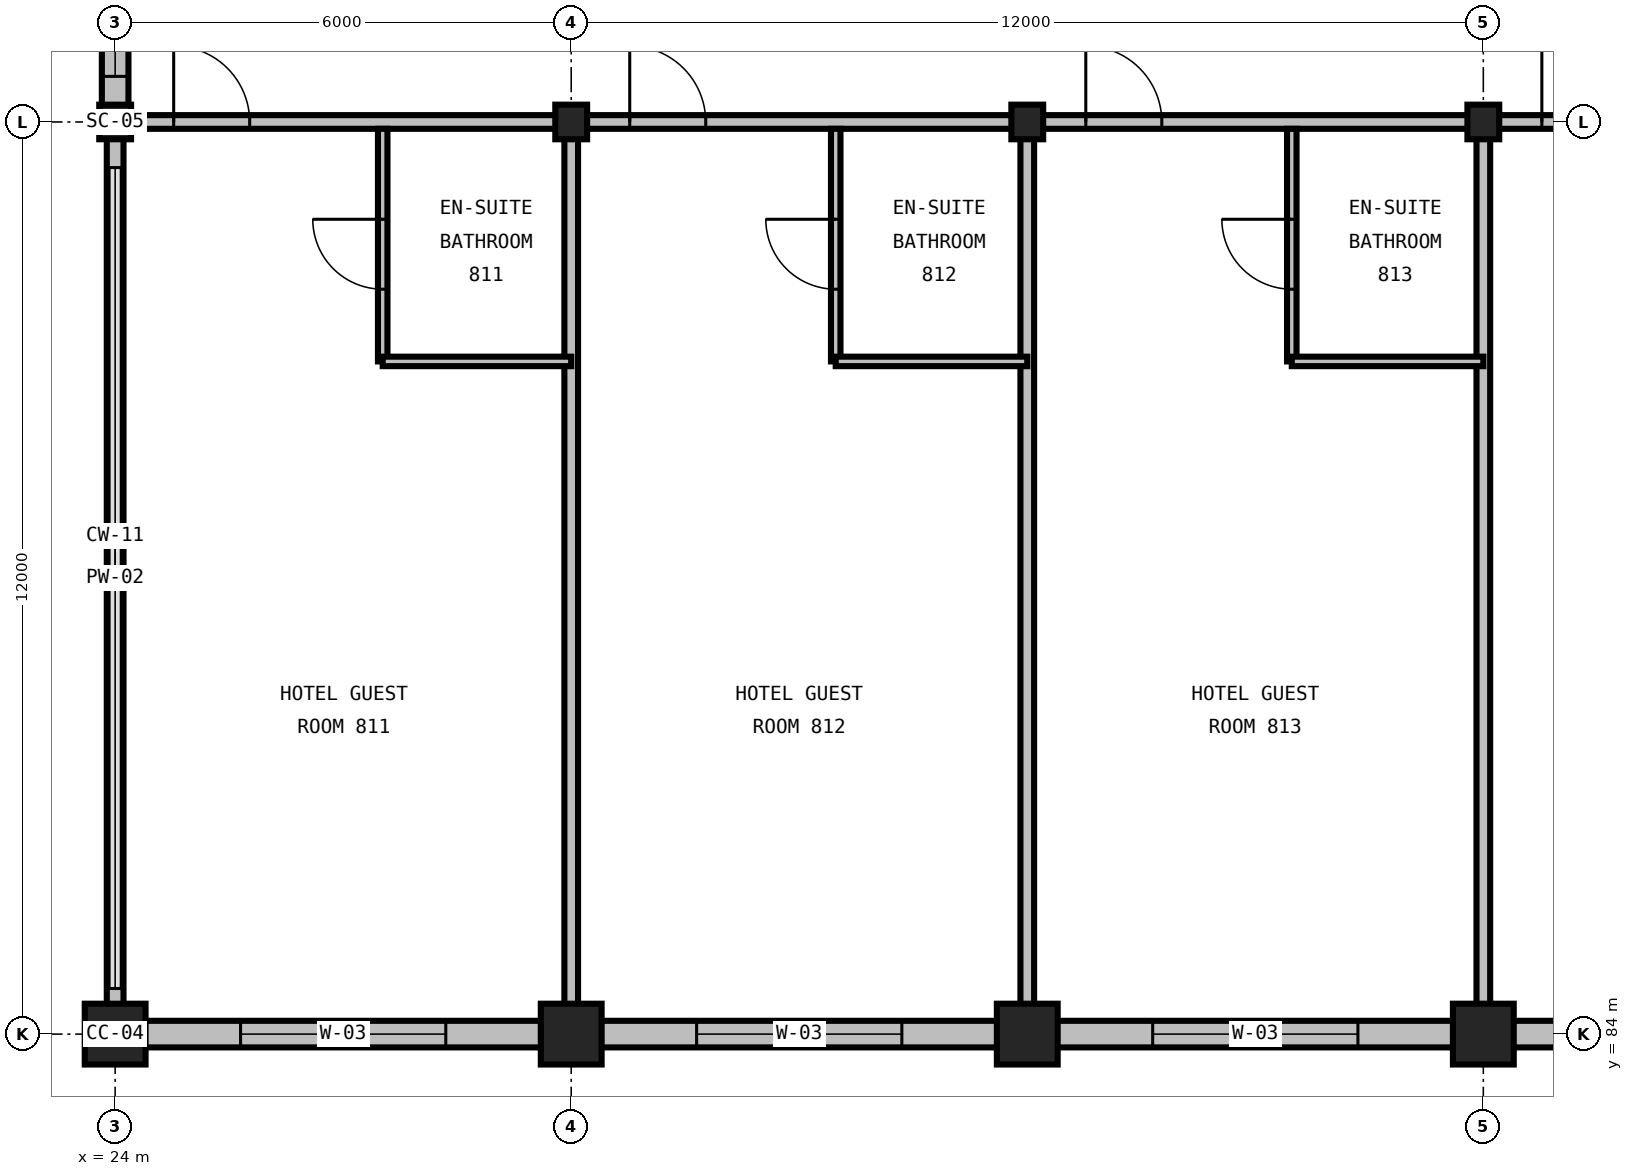
"""IFC4 building model, lengths in metres.
Left out: names, types, materials, properties, quantities, classifications, styles, units other than length and angle.
Written with IfcOpenShell. Run it as: python <this file> out.ifc"""

import sys

from ifc_helpers import new_model, si_unit, direction, frame, frame_2d, origin, origin_2d, place, context, subcontext, project, spatial, rectangle, i_section, extrude, element, fill, save


model = new_model("IFC4")
c1 = context("Model", 3, precision=1e-05, world=origin(), true_north=direction((0.0, 1.0)))
c2 = subcontext(c1, "Body", "Model", "MODEL_VIEW")
j1 = project(units=[si_unit("LENGTHUNIT", "METRE"), si_unit("PLANEANGLEUNIT", "RADIAN")], contexts=[c1])
p1 = place(None, origin())
s1 = spatial("IfcSite", under=j1, at=p1, CompositionType="ELEMENT")
p2 = place(p1, origin())
s2 = spatial("IfcBuilding", under=s1, at=p2, CompositionType="ELEMENT")
p3 = place(p2, frame((0.0, 0.0, 38.4)))
s3 = spatial("IfcBuildingStorey", under=s2, at=p3, CompositionType="ELEMENT", Elevation=38.4)
p4 = place(p3, frame((24.0, 84.0, 0.0), z_axis=(0.0, 0.0, 1.0), x_axis=(1.0, 0.0, 0.0)))
e1 = element("IfcColumn", 1, at=p4, inside=s3, PredefinedType="COLUMN", context=c2, shape_type="SweptSolid", body=[
    extrude(rectangle(XDim=0.8, YDim=0.8, at=origin_2d()), origin(), (0.0, 0.0, 1.0), 3.6),
])
p5 = place(p3, frame((24.0, 96.0, 0.0), z_axis=(0.0, 0.0, 1.0), x_axis=(1.0, 0.0, 0.0)))
e2 = element("IfcColumn", 2, at=p5, inside=s3, PredefinedType="COLUMN", context=c2, shape_type="SweptSolid", body=[
    extrude(i_section(OverallWidth=0.419, OverallDepth=0.455, WebThickness=0.042, FlangeThickness=0.068, FilletRadius=0.031, at=origin_2d()), origin(), (0.0, 0.0, 1.0), 3.6),
])
p6 = place(p3, frame((30.0, 84.0, 0.0), z_axis=(0.0, 0.0, 1.0), x_axis=(1.0, 0.0, 0.0)))
e3 = element("IfcColumn", 3, at=p6, inside=s3, PredefinedType="COLUMN", context=c2, shape_type="SweptSolid", body=[
    extrude(rectangle(XDim=0.8, YDim=0.8, at=origin_2d()), origin(), (0.0, 0.0, 1.0), 3.6),
])
p7 = place(p3, frame((30.0, 96.0, 0.0), z_axis=(0.0, 0.0, 1.0), x_axis=(1.0, 0.0, 0.0)))
e4 = element("IfcColumn", 4, at=p7, inside=s3, PredefinedType="COLUMN", context=c2, shape_type="SweptSolid", body=[
    extrude(i_section(OverallWidth=0.419, OverallDepth=0.455, WebThickness=0.042, FlangeThickness=0.068, FilletRadius=0.031, at=origin_2d()), origin(), (0.0, 0.0, 1.0), 3.6),
])
p8 = place(p3, frame((36.0, 84.0, 0.0), z_axis=(0.0, 0.0, 1.0), x_axis=(1.0, 0.0, 0.0)))
e5 = element("IfcColumn", 5, at=p8, inside=s3, PredefinedType="COLUMN", context=c2, shape_type="SweptSolid", body=[
    extrude(rectangle(XDim=0.8, YDim=0.8, at=origin_2d()), origin(), (0.0, 0.0, 1.0), 3.6),
])
p9 = place(p3, frame((36.0, 96.0, 0.0), z_axis=(0.0, 0.0, 1.0), x_axis=(1.0, 0.0, 0.0)))
e6 = element("IfcColumn", 6, at=p9, inside=s3, PredefinedType="COLUMN", context=c2, shape_type="SweptSolid", body=[
    extrude(i_section(OverallWidth=0.419, OverallDepth=0.455, WebThickness=0.042, FlangeThickness=0.068, FilletRadius=0.031, at=origin_2d()), origin(), (0.0, 0.0, 1.0), 3.6),
])
p10 = place(p3, frame((42.0, 84.0, 0.0), z_axis=(0.0, 0.0, 1.0), x_axis=(1.0, 0.0, 0.0)))
e7 = element("IfcColumn", 7, at=p10, inside=s3, PredefinedType="COLUMN", context=c2, shape_type="SweptSolid", body=[
    extrude(rectangle(XDim=0.8, YDim=0.8, at=origin_2d()), origin(), (0.0, 0.0, 1.0), 3.6),
])
p11 = place(p3, frame((42.0, 96.0, 0.0), z_axis=(0.0, 0.0, 1.0), x_axis=(1.0, 0.0, 0.0)))
e8 = element("IfcColumn", 8, at=p11, inside=s3, PredefinedType="COLUMN", context=c2, shape_type="SweptSolid", body=[
    extrude(i_section(OverallWidth=0.419, OverallDepth=0.455, WebThickness=0.042, FlangeThickness=0.068, FilletRadius=0.031, at=origin_2d()), origin(), (0.0, 0.0, 1.0), 3.6),
])
p12 = place(p3, frame((24.0, 84.0, 0.0), z_axis=(0.0, 0.0, 1.0), x_axis=(1.0, 0.0, 0.0)))
e9 = element("IfcWall", 9, at=p12, inside=s3, PredefinedType="STANDARD", context=c2, shape_type="SweptSolid", body=[
    extrude(rectangle(XDim=6.0, YDim=0.35, at=frame_2d((3.0, 0.0))), origin(), (0.0, 0.0, 1.0), 2.486),
])
p13 = place(p12, frame((1.65, 0.0, 0.72)))
e10 = element("IfcOpeningElement", 10, at=p13, cuts=e9, PredefinedType="OPENING", context=c2, shape_type="SweptSolid", body=[
    extrude(rectangle(XDim=2.7, YDim=1.65, at=frame_2d((1.35, 0.825))), frame((0.0, 0.19, 0.0), z_axis=(0.0, -1.0, 0.0), x_axis=(1.0, 0.0, 0.0)), (0.0, 0.0, 1.0), 0.38),
])
p14 = place(p3, frame((30.0, 84.0, 0.0), z_axis=(0.0, 0.0, 1.0), x_axis=(1.0, 0.0, 0.0)))
e11 = element("IfcWall", 11, at=p14, inside=s3, PredefinedType="STANDARD", context=c2, shape_type="SweptSolid", body=[
    extrude(rectangle(XDim=6.0, YDim=0.35, at=frame_2d((3.0, 0.0))), origin(), (0.0, 0.0, 1.0), 2.486),
])
p15 = place(p14, frame((1.65, 0.0, 0.72)))
e12 = element("IfcOpeningElement", 12, at=p15, cuts=e11, PredefinedType="OPENING", context=c2, shape_type="SweptSolid", body=[
    extrude(rectangle(XDim=2.7, YDim=1.65, at=frame_2d((1.35, 0.825))), frame((0.0, 0.19, 0.0), z_axis=(0.0, -1.0, 0.0), x_axis=(1.0, 0.0, 0.0)), (0.0, 0.0, 1.0), 0.38),
])
p16 = place(p3, frame((36.0, 84.0, 0.0), z_axis=(0.0, 0.0, 1.0), x_axis=(1.0, 0.0, 0.0)))
e13 = element("IfcWall", 13, at=p16, inside=s3, PredefinedType="STANDARD", context=c2, shape_type="SweptSolid", body=[
    extrude(rectangle(XDim=6.0, YDim=0.35, at=frame_2d((3.0, 0.0))), origin(), (0.0, 0.0, 1.0), 2.486),
])
p17 = place(p16, frame((1.65, 0.0, 0.72)))
e14 = element("IfcOpeningElement", 14, at=p17, cuts=e13, PredefinedType="OPENING", context=c2, shape_type="SweptSolid", body=[
    extrude(rectangle(XDim=2.7, YDim=1.65, at=frame_2d((1.35, 0.825))), frame((0.0, 0.19, 0.0), z_axis=(0.0, -1.0, 0.0), x_axis=(1.0, 0.0, 0.0)), (0.0, 0.0, 1.0), 0.38),
])
p18 = place(p3, frame((42.0, 84.0, 0.0), z_axis=(0.0, 0.0, 1.0), x_axis=(1.0, 0.0, 0.0)))
e15 = element("IfcWall", 15, at=p18, inside=s3, PredefinedType="STANDARD", context=c2, shape_type="SweptSolid", body=[
    extrude(rectangle(XDim=12.0, YDim=0.35, at=frame_2d((6.0, 0.0))), origin(), (0.0, 0.0, 1.0), 2.486),
])
p19 = place(p18, frame((1.65, 0.0, 0.72)))
e16 = element("IfcOpeningElement", 16, at=p19, cuts=e15, PredefinedType="OPENING", context=c2, shape_type="SweptSolid", body=[
    extrude(rectangle(XDim=2.7, YDim=1.65, at=frame_2d((1.35, 0.825))), frame((0.0, 0.19, 0.0), z_axis=(0.0, -1.0, 0.0), x_axis=(1.0, 0.0, 0.0)), (0.0, 0.0, 1.0), 0.38),
])
p20 = place(p18, frame((7.65, 0.0, 0.72)))
e17 = element("IfcOpeningElement", 17, at=p20, cuts=e15, PredefinedType="OPENING", context=c2, shape_type="SweptSolid", body=[
    extrude(rectangle(XDim=2.7, YDim=1.65, at=frame_2d((1.35, 0.825))), frame((0.0, 0.19, 0.0), z_axis=(0.0, -1.0, 0.0), x_axis=(1.0, 0.0, 0.0)), (0.0, 0.0, 1.0), 0.38),
])
p21 = place(p3, frame((24.0, 96.0, 0.0), z_axis=(0.0, 0.0, 1.0), x_axis=(0.0, -1.0, 0.0)))
e18 = element("IfcWall", 18, at=p21, inside=s3, PredefinedType="PARAPET", context=c2, shape_type="SweptSolid", body=[
    extrude(rectangle(XDim=12.0, YDim=0.22, at=frame_2d((6.0, 0.0))), origin(), (0.0, 0.0, 1.0), 0.2),
])
p22 = place(p3, frame((24.0, 105.0, 0.0), z_axis=(0.0, 0.0, 1.0), x_axis=(0.0, -1.0, 0.0)))
e19 = element("IfcWall", 19, at=p22, inside=s3, PredefinedType="STANDARD", context=c2, shape_type="SweptSolid", body=[
    extrude(rectangle(XDim=9.0, YDim=0.35, at=frame_2d((4.5, 0.0))), origin(), (0.0, 0.0, 1.0), 2.981),
])
p23 = place(p22, frame((6.6, 0.0, 0.85)))
e20 = element("IfcOpeningElement", 20, at=p23, cuts=e19, PredefinedType="OPENING", context=c2, shape_type="SweptSolid", body=[
    extrude(rectangle(XDim=1.8, YDim=1.5, at=frame_2d((0.9, 0.75))), frame((0.0, 0.19, 0.0), z_axis=(0.0, -1.0, 0.0), x_axis=(1.0, 0.0, 0.0)), (0.0, 0.0, 1.0), 0.38),
])
p24 = place(p3, frame((24.085, 96.0, 0.0), z_axis=(0.0, 0.0, 1.0), x_axis=(1.0, 0.0, 0.0)))
e21 = element("IfcWall", 21, at=p24, inside=s3, PredefinedType="PARTITIONING", context=c2, shape_type="SweptSolid", body=[
    extrude(rectangle(XDim=5.915, YDim=0.18, at=frame_2d((2.957, 0.0))), origin(), (0.0, 0.0, 1.0), 2.736),
])
p25 = place(p24, frame((0.685, 0.0, 0.0)))
e22 = element("IfcOpeningElement", 22, at=p25, cuts=e21, PredefinedType="OPENING", context=c2, shape_type="SweptSolid", body=[
    extrude(rectangle(XDim=1.0, YDim=2.15, at=frame_2d((0.5, 1.075))), frame((0.0, 0.105, 0.0), z_axis=(0.0, -1.0, 0.0), x_axis=(1.0, 0.0, 0.0)), (0.0, 0.0, 1.0), 0.21),
])
p26 = place(p3, frame((30.0, 84.175, 0.0), z_axis=(0.0, 0.0, 1.0), x_axis=(0.0, 1.0, 0.0)))
e23 = element("IfcWall", 23, at=p26, inside=s3, PredefinedType="PARTITIONING", context=c2, shape_type="SweptSolid", body=[
    extrude(rectangle(XDim=11.825, YDim=0.18, at=frame_2d((5.913, 0.0))), origin(), (0.0, 0.0, 1.0), 2.59),
])
p27 = place(p3, frame((27.52, 92.85, 0.0), z_axis=(0.0, 0.0, 1.0), x_axis=(0.0, 1.0, 0.0)))
e24 = element("IfcWall", 24, at=p27, inside=s3, PredefinedType="PARTITIONING", context=c2, shape_type="SweptSolid", body=[
    extrude(rectangle(XDim=3.06, YDim=0.125, at=frame_2d((1.53, 0.0))), origin(), (0.0, 0.0, 1.0), 3.29),
])
p28 = place(p27, frame((0.95, 0.0, 0.0)))
e25 = element("IfcOpeningElement", 25, at=p28, cuts=e24, PredefinedType="OPENING", context=c2, shape_type="SweptSolid", body=[
    extrude(rectangle(XDim=0.92, YDim=2.1, at=frame_2d((0.46, 1.05))), frame((0.0, 0.077, 0.0), z_axis=(0.0, -1.0, 0.0), x_axis=(1.0, 0.0, 0.0)), (0.0, 0.0, 1.0), 0.155),
])
p29 = place(p3, frame((27.52, 92.85, 0.0), z_axis=(0.0, 0.0, 1.0), x_axis=(1.0, 0.0, 0.0)))
e26 = element("IfcWall", 26, at=p29, inside=s3, PredefinedType="PARTITIONING", context=c2, shape_type="SweptSolid", body=[
    extrude(rectangle(XDim=2.48, YDim=0.125, at=frame_2d((1.24, 0.0))), origin(), (0.0, 0.0, 1.0), 3.29),
])
p30 = place(p3, frame((30.0, 96.0, 0.0), z_axis=(0.0, 0.0, 1.0), x_axis=(1.0, 0.0, 0.0)))
e27 = element("IfcWall", 27, at=p30, inside=s3, PredefinedType="PARTITIONING", context=c2, shape_type="SweptSolid", body=[
    extrude(rectangle(XDim=6.0, YDim=0.18, at=frame_2d((3.0, 0.0))), origin(), (0.0, 0.0, 1.0), 2.736),
])
p31 = place(p30, frame((0.77, 0.0, 0.0)))
e28 = element("IfcOpeningElement", 28, at=p31, cuts=e27, PredefinedType="OPENING", context=c2, shape_type="SweptSolid", body=[
    extrude(rectangle(XDim=1.0, YDim=2.15, at=frame_2d((0.5, 1.075))), frame((0.0, 0.105, 0.0), z_axis=(0.0, -1.0, 0.0), x_axis=(1.0, 0.0, 0.0)), (0.0, 0.0, 1.0), 0.21),
])
p32 = place(p3, frame((36.0, 84.175, 0.0), z_axis=(0.0, 0.0, 1.0), x_axis=(0.0, 1.0, 0.0)))
e29 = element("IfcWall", 29, at=p32, inside=s3, PredefinedType="PARTITIONING", context=c2, shape_type="SweptSolid", body=[
    extrude(rectangle(XDim=11.825, YDim=0.18, at=frame_2d((5.913, 0.0))), origin(), (0.0, 0.0, 1.0), 2.59),
])
p33 = place(p3, frame((33.48, 92.85, 0.0), z_axis=(0.0, 0.0, 1.0), x_axis=(0.0, 1.0, 0.0)))
e30 = element("IfcWall", 30, at=p33, inside=s3, PredefinedType="PARTITIONING", context=c2, shape_type="SweptSolid", body=[
    extrude(rectangle(XDim=3.06, YDim=0.125, at=frame_2d((1.53, 0.0))), origin(), (0.0, 0.0, 1.0), 3.29),
])
p34 = place(p33, frame((0.95, 0.0, 0.0)))
e31 = element("IfcOpeningElement", 31, at=p34, cuts=e30, PredefinedType="OPENING", context=c2, shape_type="SweptSolid", body=[
    extrude(rectangle(XDim=0.92, YDim=2.1, at=frame_2d((0.46, 1.05))), frame((0.0, 0.077, 0.0), z_axis=(0.0, -1.0, 0.0), x_axis=(1.0, 0.0, 0.0)), (0.0, 0.0, 1.0), 0.155),
])
p35 = place(p3, frame((33.48, 92.85, 0.0), z_axis=(0.0, 0.0, 1.0), x_axis=(1.0, 0.0, 0.0)))
e32 = element("IfcWall", 32, at=p35, inside=s3, PredefinedType="PARTITIONING", context=c2, shape_type="SweptSolid", body=[
    extrude(rectangle(XDim=2.52, YDim=0.125, at=frame_2d((1.26, 0.0))), origin(), (0.0, 0.0, 1.0), 3.29),
])
p36 = place(p3, frame((36.0, 96.0, 0.0), z_axis=(0.0, 0.0, 1.0), x_axis=(1.0, 0.0, 0.0)))
e33 = element("IfcWall", 33, at=p36, inside=s3, PredefinedType="PARTITIONING", context=c2, shape_type="SweptSolid", body=[
    extrude(rectangle(XDim=6.0, YDim=0.18, at=frame_2d((3.0, 0.0))), origin(), (0.0, 0.0, 1.0), 2.736),
])
p37 = place(p36, frame((0.77, 0.0, 0.0)))
e34 = element("IfcOpeningElement", 34, at=p37, cuts=e33, PredefinedType="OPENING", context=c2, shape_type="SweptSolid", body=[
    extrude(rectangle(XDim=1.0, YDim=2.15, at=frame_2d((0.5, 1.075))), frame((0.0, 0.105, 0.0), z_axis=(0.0, -1.0, 0.0), x_axis=(1.0, 0.0, 0.0)), (0.0, 0.0, 1.0), 0.21),
])
p38 = place(p3, frame((42.0, 84.175, 0.0), z_axis=(0.0, 0.0, 1.0), x_axis=(0.0, 1.0, 0.0)))
e35 = element("IfcWall", 35, at=p38, inside=s3, PredefinedType="PARTITIONING", context=c2, shape_type="SweptSolid", body=[
    extrude(rectangle(XDim=11.825, YDim=0.18, at=frame_2d((5.913, 0.0))), origin(), (0.0, 0.0, 1.0), 2.59),
])
p39 = place(p3, frame((39.48, 92.85, 0.0), z_axis=(0.0, 0.0, 1.0), x_axis=(0.0, 1.0, 0.0)))
e36 = element("IfcWall", 36, at=p39, inside=s3, PredefinedType="PARTITIONING", context=c2, shape_type="SweptSolid", body=[
    extrude(rectangle(XDim=3.06, YDim=0.125, at=frame_2d((1.53, 0.0))), origin(), (0.0, 0.0, 1.0), 3.29),
])
p40 = place(p39, frame((0.95, 0.0, 0.0)))
e37 = element("IfcOpeningElement", 37, at=p40, cuts=e36, PredefinedType="OPENING", context=c2, shape_type="SweptSolid", body=[
    extrude(rectangle(XDim=0.92, YDim=2.1, at=frame_2d((0.46, 1.05))), frame((0.0, 0.077, 0.0), z_axis=(0.0, -1.0, 0.0), x_axis=(1.0, 0.0, 0.0)), (0.0, 0.0, 1.0), 0.155),
])
p41 = place(p3, frame((39.48, 92.85, 0.0), z_axis=(0.0, 0.0, 1.0), x_axis=(1.0, 0.0, 0.0)))
e38 = element("IfcWall", 38, at=p41, inside=s3, PredefinedType="PARTITIONING", context=c2, shape_type="SweptSolid", body=[
    extrude(rectangle(XDim=2.52, YDim=0.125, at=frame_2d((1.26, 0.0))), origin(), (0.0, 0.0, 1.0), 3.29),
])
p42 = place(p3, frame((42.0, 96.0, 0.0), z_axis=(0.0, 0.0, 1.0), x_axis=(1.0, 0.0, 0.0)))
e39 = element("IfcWall", 39, at=p42, inside=s3, PredefinedType="PARTITIONING", context=c2, shape_type="SweptSolid", body=[
    extrude(rectangle(XDim=6.0, YDim=0.18, at=frame_2d((3.0, 0.0))), origin(), (0.0, 0.0, 1.0), 2.359),
])
p43 = place(p42, frame((0.77, 0.0, 0.0)))
e40 = element("IfcOpeningElement", 40, at=p43, cuts=e39, PredefinedType="OPENING", context=c2, shape_type="SweptSolid", body=[
    extrude(rectangle(XDim=1.0, YDim=2.15, at=frame_2d((0.5, 1.075))), frame((0.0, 0.105, 0.0), z_axis=(0.0, -1.0, 0.0), x_axis=(1.0, 0.0, 0.0)), (0.0, 0.0, 1.0), 0.21),
])
p44 = place(p13, origin())
e41 = element("IfcWindow", 41, at=p44, inside=s3, PartitioningType="TRIPLE_PANEL_VERTICAL", PredefinedType="WINDOW", context=c2, shape_type="SweptSolid", body=[
    extrude(rectangle(XDim=2.7, YDim=1.65, at=frame_2d((1.35, 0.825))), frame((0.0, 0.03, 0.0), z_axis=(0.0, -1.0, 0.0), x_axis=(1.0, 0.0, 0.0)), (0.0, 0.0, 1.0), 0.06),
])
fill(e10, e41)
p45 = place(p15, origin())
e42 = element("IfcWindow", 42, at=p45, inside=s3, PartitioningType="TRIPLE_PANEL_VERTICAL", PredefinedType="WINDOW", context=c2, shape_type="SweptSolid", body=[
    extrude(rectangle(XDim=2.7, YDim=1.65, at=frame_2d((1.35, 0.825))), frame((0.0, 0.03, 0.0), z_axis=(0.0, -1.0, 0.0), x_axis=(1.0, 0.0, 0.0)), (0.0, 0.0, 1.0), 0.06),
])
fill(e12, e42)
p46 = place(p17, origin())
e43 = element("IfcWindow", 43, at=p46, inside=s3, PartitioningType="TRIPLE_PANEL_VERTICAL", PredefinedType="WINDOW", context=c2, shape_type="SweptSolid", body=[
    extrude(rectangle(XDim=2.7, YDim=1.65, at=frame_2d((1.35, 0.825))), frame((0.0, 0.03, 0.0), z_axis=(0.0, -1.0, 0.0), x_axis=(1.0, 0.0, 0.0)), (0.0, 0.0, 1.0), 0.06),
])
fill(e14, e43)
p47 = place(p23, origin())
e44 = element("IfcWindow", 44, at=p47, inside=s3, PartitioningType="SINGLE_PANEL", PredefinedType="WINDOW", context=c2, shape_type="SweptSolid", body=[
    extrude(rectangle(XDim=1.8, YDim=1.5, at=frame_2d((0.9, 0.75))), frame((0.0, 0.03, 0.0), z_axis=(0.0, -1.0, 0.0), x_axis=(1.0, 0.0, 0.0)), (0.0, 0.0, 1.0), 0.06),
])
fill(e20, e44)
p48 = place(p25, origin())
e45 = element("IfcDoor", 45, at=p48, inside=s3, OperationType="SINGLE_SWING_LEFT", PredefinedType="DOOR", context=c2, shape_type="SweptSolid", body=[
    extrude(rectangle(XDim=1.0, YDim=2.15, at=frame_2d((0.5, 1.075))), frame((0.0, 0.025, 0.0), z_axis=(0.0, -1.0, 0.0), x_axis=(1.0, 0.0, 0.0)), (0.0, 0.0, 1.0), 0.05),
])
fill(e22, e45)
p49 = place(p28, origin())
e46 = element("IfcDoor", 46, at=p49, inside=s3, OperationType="SINGLE_SWING_RIGHT", PredefinedType="DOOR", context=c2, shape_type="SweptSolid", body=[
    extrude(rectangle(XDim=0.92, YDim=2.1, at=frame_2d((0.46, 1.05))), frame((0.0, 0.025, 0.0), z_axis=(0.0, -1.0, 0.0), x_axis=(1.0, 0.0, 0.0)), (0.0, 0.0, 1.0), 0.05),
])
fill(e25, e46)
p50 = place(p31, origin())
e47 = element("IfcDoor", 47, at=p50, inside=s3, OperationType="SINGLE_SWING_LEFT", PredefinedType="DOOR", context=c2, shape_type="SweptSolid", body=[
    extrude(rectangle(XDim=1.0, YDim=2.15, at=frame_2d((0.5, 1.075))), frame((0.0, 0.025, 0.0), z_axis=(0.0, -1.0, 0.0), x_axis=(1.0, 0.0, 0.0)), (0.0, 0.0, 1.0), 0.05),
])
fill(e28, e47)
p51 = place(p34, origin())
e48 = element("IfcDoor", 48, at=p51, inside=s3, OperationType="SINGLE_SWING_RIGHT", PredefinedType="DOOR", context=c2, shape_type="SweptSolid", body=[
    extrude(rectangle(XDim=0.92, YDim=2.1, at=frame_2d((0.46, 1.05))), frame((0.0, 0.025, 0.0), z_axis=(0.0, -1.0, 0.0), x_axis=(1.0, 0.0, 0.0)), (0.0, 0.0, 1.0), 0.05),
])
fill(e31, e48)
p52 = place(p37, origin())
e49 = element("IfcDoor", 49, at=p52, inside=s3, OperationType="SINGLE_SWING_LEFT", PredefinedType="DOOR", context=c2, shape_type="SweptSolid", body=[
    extrude(rectangle(XDim=1.0, YDim=2.15, at=frame_2d((0.5, 1.075))), frame((0.0, 0.025, 0.0), z_axis=(0.0, -1.0, 0.0), x_axis=(1.0, 0.0, 0.0)), (0.0, 0.0, 1.0), 0.05),
])
fill(e34, e49)
p53 = place(p40, origin())
e50 = element("IfcDoor", 50, at=p53, inside=s3, OperationType="SINGLE_SWING_RIGHT", PredefinedType="DOOR", context=c2, shape_type="SweptSolid", body=[
    extrude(rectangle(XDim=0.92, YDim=2.1, at=frame_2d((0.46, 1.05))), frame((0.0, 0.025, 0.0), z_axis=(0.0, -1.0, 0.0), x_axis=(1.0, 0.0, 0.0)), (0.0, 0.0, 1.0), 0.05),
])
fill(e37, e50)
p54 = place(p43, origin())
e51 = element("IfcDoor", 51, at=p54, inside=s3, OperationType="SINGLE_SWING_LEFT", PredefinedType="DOOR", context=c2, shape_type="SweptSolid", body=[
    extrude(rectangle(XDim=1.0, YDim=2.15, at=frame_2d((0.5, 1.075))), frame((0.0, 0.025, 0.0), z_axis=(0.0, -1.0, 0.0), x_axis=(1.0, 0.0, 0.0)), (0.0, 0.0, 1.0), 0.05),
])
fill(e40, e51)
save(model, sys.argv[1])
